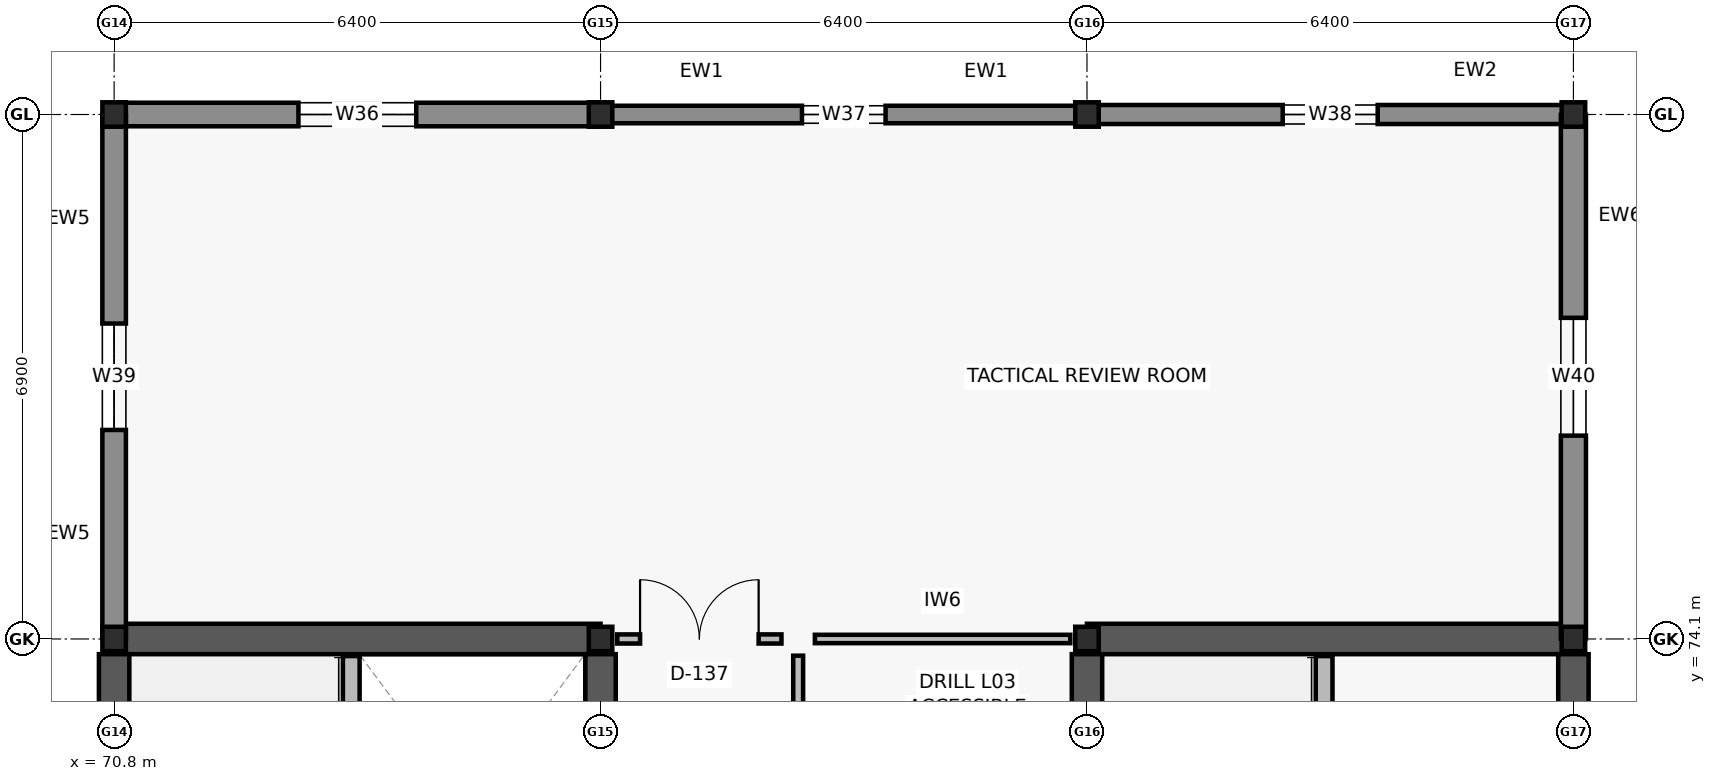
"""IFC4 building model, lengths in metres.
Left out: names, types, materials, properties, quantities, classifications, styles, units other than length and angle.
Written with IfcOpenShell. Run it as: python <this file> out.ifc"""

import sys

from ifc_helpers import new_model, si_unit, direction, frame, frame_2d, origin, origin_2d, place, context, subcontext, project, spatial, rectangle, i_section, extrude, element, fill, save


model = new_model("IFC4")
c1 = context("Model", 3, precision=1e-05, world=origin(), true_north=direction((0.0, 1.0)))
c2 = subcontext(c1, "Body", "Model", "MODEL_VIEW")
j1 = project(units=[si_unit("LENGTHUNIT", "METRE"), si_unit("PLANEANGLEUNIT", "RADIAN")], contexts=[c1])
p1 = place(None, origin())
s1 = spatial("IfcSite", under=j1, at=p1, CompositionType="ELEMENT")
p2 = place(p1, origin())
s2 = spatial("IfcBuilding", under=s1, at=p2, CompositionType="ELEMENT")
p3 = place(p2, frame((0.0, 0.0, 13.5)))
s3 = spatial("IfcBuildingStorey", under=s2, at=p3, CompositionType="ELEMENT", Elevation=13.5)
for number, where, z_axis, x_axis in (
    (1, (70.8, 74.1, 0.0), (0.0, 0.0, 1.0), (1.0, 0.0, 0.0)),
    (2, (70.8, 81.0, 0.0), (0.0, 0.0, 1.0), (1.0, 0.0, 0.0)),
    (3, (77.2, 74.1, 0.0), (0.0, 0.0, 1.0), (1.0, 0.0, 0.0)),
    (4, (77.2, 81.0, 0.0), (0.0, 0.0, 1.0), (1.0, 0.0, 0.0)),
    (5, (83.6, 74.1, 0.0), (0.0, 0.0, 1.0), (1.0, 0.0, 0.0)),
    (6, (83.6, 81.0, 0.0), (0.0, 0.0, 1.0), (1.0, 0.0, 0.0)),
    (7, (90.0, 74.1, 0.0), (0.0, 0.0, 1.0), (1.0, 0.0, 0.0)),
    (8, (90.0, 81.0, 0.0), (0.0, 0.0, 1.0), (1.0, 0.0, 0.0)),
):
    element("IfcColumn", number, at=place(p3, frame(where, z_axis=z_axis, x_axis=x_axis)), inside=s3, PredefinedType="COLUMN", context=c2, shape_type="SweptSolid", body=[
        extrude(i_section(OverallWidth=0.309, OverallDepth=0.321, WebThickness=0.014, FlangeThickness=0.022, FilletRadius=0.017, at=origin_2d()), origin(), (0.0, 0.0, 1.0), 3.9),
    ])
p4 = place(p3, frame((70.8, 74.1, 0.0), z_axis=(0.0, 0.0, 1.0), x_axis=(1.0, 0.0, 0.0)))
e9 = element("IfcWall", 9, at=p4, inside=s3, PredefinedType="SHEAR", context=c2, shape_type="SweptSolid", body=[
    extrude(rectangle(XDim=6.4, YDim=0.4, at=frame_2d((3.2, 0.0))), origin(), (0.0, 0.0, 1.0), 3.66),
])
for number, where, z_axis, x_axis in (
    (10, (70.8, 67.2, 0.0), (0.0, 0.0, 1.0), (0.0, 1.0, 0.0)),
    (11, (77.2, 67.2, 0.0), (0.0, 0.0, 1.0), (0.0, 1.0, 0.0)),
):
    element("IfcWall", number, at=place(p3, frame(where, z_axis=z_axis, x_axis=x_axis)), inside=s3, PredefinedType="SHEAR", context=c2, shape_type="SweptSolid", body=[
        extrude(rectangle(XDim=6.7, YDim=0.4, at=frame_2d((3.35, 0.0))), origin(), (0.0, 0.0, 1.0), 3.66),
    ])
p5 = place(p3, frame((83.6, 74.1, 0.0), z_axis=(0.0, 0.0, 1.0), x_axis=(1.0, 0.0, 0.0)))
e12 = element("IfcWall", 12, at=p5, inside=s3, PredefinedType="SHEAR", context=c2, shape_type="SweptSolid", body=[
    extrude(rectangle(XDim=6.4, YDim=0.4, at=frame_2d((3.2, 0.0))), origin(), (0.0, 0.0, 1.0), 3.66),
])
for number, where, z_axis, x_axis in (
    (13, (83.6, 67.2, 0.0), (0.0, 0.0, 1.0), (0.0, 1.0, 0.0)),
    (14, (90.0, 67.2, 0.0), (0.0, 0.0, 1.0), (0.0, 1.0, 0.0)),
):
    element("IfcWall", number, at=place(p3, frame(where, z_axis=z_axis, x_axis=x_axis)), inside=s3, PredefinedType="SHEAR", context=c2, shape_type="SweptSolid", body=[
        extrude(rectangle(XDim=6.7, YDim=0.4, at=frame_2d((3.35, 0.0))), origin(), (0.0, 0.0, 1.0), 3.66),
    ])
p6 = place(p3, frame((70.805, 81.0, 0.0), z_axis=(0.0, 0.0, 1.0), x_axis=(1.0, 0.0, 0.0)))
e15 = element("IfcWall", 15, at=p6, inside=s3, PredefinedType="SOLIDWALL", context=c2, shape_type="SweptSolid", body=[
    extrude(rectangle(XDim=6.39, YDim=0.31, at=frame_2d((3.195, 0.0))), origin(), (0.0, 0.0, 1.0), 3.02),
])
p7 = place(p6, frame((2.42, 0.0, 0.8)))
e16 = element("IfcOpeningElement", 16, at=p7, cuts=e15, PredefinedType="OPENING", context=c2, shape_type="SweptSolid", body=[
    extrude(rectangle(XDim=1.55, YDim=1.5, at=frame_2d((0.775, 0.75))), frame((0.0, 0.165, 0.0), z_axis=(0.0, -1.0, 0.0), x_axis=(1.0, 0.0, 0.0)), (0.0, 0.0, 1.0), 0.33),
])
p8 = place(p3, frame((77.205, 81.0, 0.0), z_axis=(0.0, 0.0, 1.0), x_axis=(1.0, 0.0, 0.0)))
e17 = element("IfcWall", 17, at=p8, inside=s3, PredefinedType="SOLIDWALL", context=c2, shape_type="SweptSolid", body=[
    extrude(rectangle(XDim=6.39, YDim=0.23, at=frame_2d((3.195, 0.0))), origin(), (0.0, 0.0, 1.0), 3.02),
])
p9 = place(p8, frame((2.645, 0.0, 0.8)))
e18 = element("IfcOpeningElement", 18, at=p9, cuts=e17, PredefinedType="OPENING", context=c2, shape_type="SweptSolid", body=[
    extrude(rectangle(XDim=1.1, YDim=1.65, at=frame_2d((0.55, 0.825))), frame((0.0, 0.125, 0.0), z_axis=(0.0, -1.0, 0.0), x_axis=(1.0, 0.0, 0.0)), (0.0, 0.0, 1.0), 0.25),
])
p10 = place(p3, frame((83.605, 81.0, 0.0), z_axis=(0.0, 0.0, 1.0), x_axis=(1.0, 0.0, 0.0)))
e19 = element("IfcWall", 19, at=p10, inside=s3, PredefinedType="SOLIDWALL", context=c2, shape_type="SweptSolid", body=[
    extrude(rectangle(XDim=6.39, YDim=0.25, at=frame_2d((3.195, 0.0))), origin(), (0.0, 0.0, 1.0), 3.02),
])
p11 = place(p10, frame((2.57, 0.0, 0.8)))
e20 = element("IfcOpeningElement", 20, at=p11, cuts=e19, PredefinedType="OPENING", context=c2, shape_type="SweptSolid", body=[
    extrude(rectangle(XDim=1.25, YDim=1.65, at=frame_2d((0.625, 0.825))), frame((0.0, 0.135, 0.0), z_axis=(0.0, -1.0, 0.0), x_axis=(1.0, 0.0, 0.0)), (0.0, 0.0, 1.0), 0.27),
])
p12 = place(p3, frame((70.8, 74.105, 0.0), z_axis=(0.0, 0.0, 1.0), x_axis=(0.0, 1.0, 0.0)))
e21 = element("IfcWall", 21, at=p12, inside=s3, PredefinedType="SOLIDWALL", context=c2, shape_type="SweptSolid", body=[
    extrude(rectangle(XDim=6.89, YDim=0.31, at=frame_2d((3.445, 0.0))), origin(), (0.0, 0.0, 1.0), 3.02),
])
p13 = place(p12, frame((2.745, 0.0, 0.8)))
e22 = element("IfcOpeningElement", 22, at=p13, cuts=e21, PredefinedType="OPENING", context=c2, shape_type="SweptSolid", body=[
    extrude(rectangle(XDim=1.4, YDim=1.65, at=frame_2d((0.7, 0.825))), frame((0.0, 0.165, 0.0), z_axis=(0.0, -1.0, 0.0), x_axis=(1.0, 0.0, 0.0)), (0.0, 0.0, 1.0), 0.33),
])
p14 = place(p3, frame((90.0, 80.995, 0.0), z_axis=(0.0, 0.0, 1.0), x_axis=(0.0, -1.0, 0.0)))
e23 = element("IfcWall", 23, at=p14, inside=s3, PredefinedType="SOLIDWALL", context=c2, shape_type="SweptSolid", body=[
    extrude(rectangle(XDim=6.89, YDim=0.33, at=frame_2d((3.445, 0.0))), origin(), (0.0, 0.0, 1.0), 3.02),
])
p15 = place(p14, frame((2.67, 0.0, 0.8)))
e24 = element("IfcOpeningElement", 24, at=p15, cuts=e23, PredefinedType="OPENING", context=c2, shape_type="SweptSolid", body=[
    extrude(rectangle(XDim=1.55, YDim=1.65, at=frame_2d((0.775, 0.825))), frame((0.0, 0.175, 0.0), z_axis=(0.0, -1.0, 0.0), x_axis=(1.0, 0.0, 0.0)), (0.0, 0.0, 1.0), 0.35),
])
for number, where, z_axis, x_axis in (
    (25, (73.92, 67.32, 0.0), (0.0, 0.0, 1.0), (0.0, 1.0, 0.0)),
    (26, (86.72, 67.32, 0.0), (0.0, 0.0, 1.0), (0.0, 1.0, 0.0)),
):
    element("IfcWall", number, at=place(p3, frame(where, z_axis=z_axis, x_axis=x_axis)), inside=s3, PredefinedType="SOLIDWALL", context=c2, shape_type="SweptSolid", body=[
        extrude(rectangle(XDim=6.555, YDim=0.22, at=frame_2d((3.277, 0.0))), origin(), (0.0, 0.0, 1.0), 3.66),
    ])
p16 = place(p3, frame((79.8, 67.42, 0.0), z_axis=(0.0, 0.0, 1.0), x_axis=(0.0, 1.0, 0.0)))
e27 = element("IfcWall", 27, at=p16, inside=s3, PredefinedType="PARTITIONING", context=c2, shape_type="SweptSolid", body=[
    extrude(rectangle(XDim=6.46, YDim=0.13, at=frame_2d((3.23, 0.0))), origin(), (0.0, 0.0, 1.0), 3.0),
])
p17 = place(p16, frame((2.49, 0.0, 0.0)))
e28 = element("IfcOpeningElement", 28, at=p17, cuts=e27, PredefinedType="OPENING", context=c2, shape_type="SweptSolid", body=[
    extrude(rectangle(XDim=1.48, YDim=2.18, at=frame_2d((0.74, 1.09))), frame((0.0, 0.075, 0.0), z_axis=(0.0, -1.0, 0.0), x_axis=(1.0, 0.0, 0.0)), (0.0, 0.0, 1.0), 0.15),
])
p18 = place(p3, frame((77.42, 74.1, 0.0), z_axis=(0.0, 0.0, 1.0), x_axis=(1.0, 0.0, 0.0)))
e29 = element("IfcWall", 29, at=p18, inside=s3, PredefinedType="PARTITIONING", context=c2, shape_type="SweptSolid", body=[
    extrude(rectangle(XDim=2.16, YDim=0.12, at=frame_2d((1.08, 0.0))), origin(), (0.0, 0.0, 1.0), 3.0),
])
p19 = place(p18, frame((0.3, 0.0, 0.0)))
e30 = element("IfcOpeningElement", 30, at=p19, cuts=e29, PredefinedType="OPENING", context=c2, shape_type="SweptSolid", body=[
    extrude(rectangle(XDim=1.56, YDim=2.18, at=frame_2d((0.78, 1.09))), frame((0.0, 0.07, 0.0), z_axis=(0.0, -1.0, 0.0), x_axis=(1.0, 0.0, 0.0)), (0.0, 0.0, 1.0), 0.14),
])
p20 = place(p3, frame((80.02, 74.1, 0.0), z_axis=(0.0, 0.0, 1.0), x_axis=(1.0, 0.0, 0.0)))
e31 = element("IfcWall", 31, at=p20, inside=s3, PredefinedType="PARTITIONING", context=c2, shape_type="SweptSolid", body=[
    extrude(rectangle(XDim=3.36, YDim=0.11, at=frame_2d((1.68, 0.0))), origin(), (0.0, 0.0, 1.0), 3.0),
])
p21 = place(p7, origin())
e32 = element("IfcWindow", 32, at=p21, inside=s3, PartitioningType="SINGLE_PANEL", PredefinedType="WINDOW", context=c2, shape_type="SweptSolid", body=[
    extrude(rectangle(XDim=1.55, YDim=1.5, at=frame_2d((0.775, 0.75))), frame((0.0, 0.03, 0.0), z_axis=(0.0, -1.0, 0.0), x_axis=(1.0, 0.0, 0.0)), (0.0, 0.0, 1.0), 0.06),
])
fill(e16, e32)
p22 = place(p9, origin())
e33 = element("IfcWindow", 33, at=p22, inside=s3, PartitioningType="SINGLE_PANEL", PredefinedType="WINDOW", context=c2, shape_type="SweptSolid", body=[
    extrude(rectangle(XDim=1.1, YDim=1.65, at=frame_2d((0.55, 0.825))), frame((0.0, 0.03, 0.0), z_axis=(0.0, -1.0, 0.0), x_axis=(1.0, 0.0, 0.0)), (0.0, 0.0, 1.0), 0.06),
])
fill(e18, e33)
p23 = place(p11, origin())
e34 = element("IfcWindow", 34, at=p23, inside=s3, PartitioningType="SINGLE_PANEL", PredefinedType="WINDOW", context=c2, shape_type="SweptSolid", body=[
    extrude(rectangle(XDim=1.25, YDim=1.65, at=frame_2d((0.625, 0.825))), frame((0.0, 0.03, 0.0), z_axis=(0.0, -1.0, 0.0), x_axis=(1.0, 0.0, 0.0)), (0.0, 0.0, 1.0), 0.06),
])
fill(e20, e34)
p24 = place(p13, origin())
e35 = element("IfcWindow", 35, at=p24, inside=s3, PartitioningType="SINGLE_PANEL", PredefinedType="WINDOW", context=c2, shape_type="SweptSolid", body=[
    extrude(rectangle(XDim=1.4, YDim=1.65, at=frame_2d((0.7, 0.825))), frame((0.0, 0.03, 0.0), z_axis=(0.0, -1.0, 0.0), x_axis=(1.0, 0.0, 0.0)), (0.0, 0.0, 1.0), 0.06),
])
fill(e22, e35)
p25 = place(p15, origin())
e36 = element("IfcWindow", 36, at=p25, inside=s3, PartitioningType="SINGLE_PANEL", PredefinedType="WINDOW", context=c2, shape_type="SweptSolid", body=[
    extrude(rectangle(XDim=1.55, YDim=1.65, at=frame_2d((0.775, 0.825))), frame((0.0, 0.03, 0.0), z_axis=(0.0, -1.0, 0.0), x_axis=(1.0, 0.0, 0.0)), (0.0, 0.0, 1.0), 0.06),
])
fill(e24, e36)
p26 = place(p19, origin())
e37 = element("IfcDoor", 37, at=p26, inside=s3, OperationType="DOUBLE_DOOR_SINGLE_SWING", PredefinedType="DOOR", context=c2, shape_type="SweptSolid", body=[
    extrude(rectangle(XDim=1.56, YDim=2.18, at=frame_2d((0.78, 1.09))), frame((0.0, 0.025, 0.0), z_axis=(0.0, -1.0, 0.0), x_axis=(1.0, 0.0, 0.0)), (0.0, 0.0, 1.0), 0.05),
])
fill(e30, e37)
save(model, sys.argv[1])
